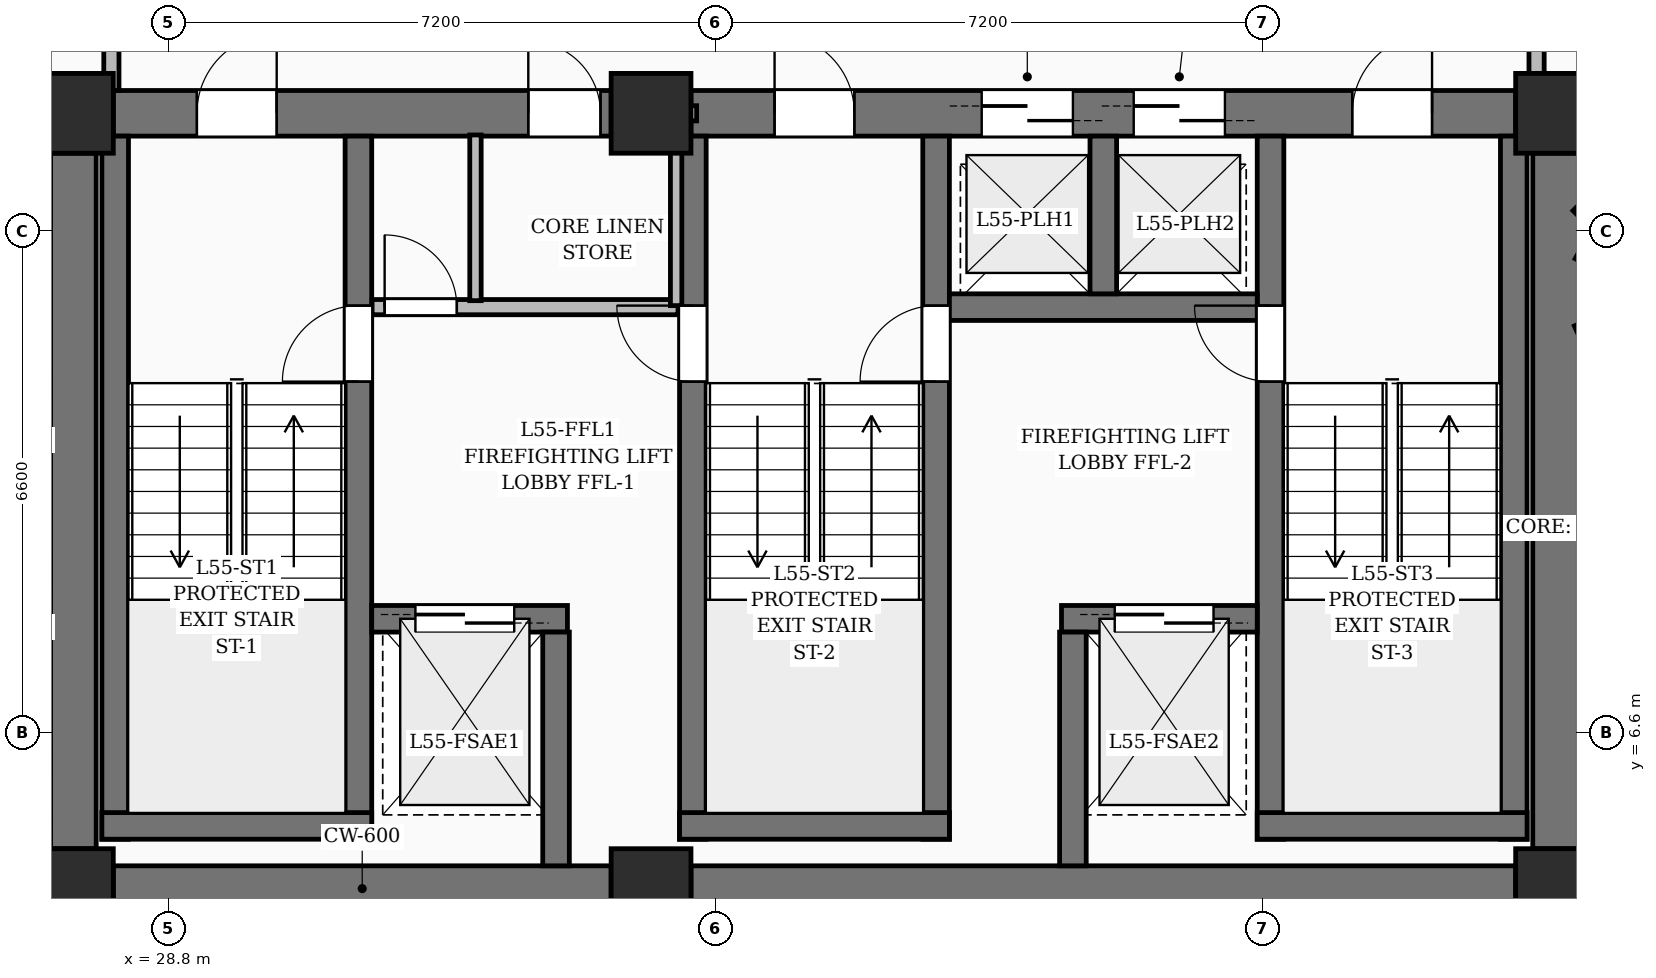
"""IFC4 building model, lengths in metres.
Left out: names, types, materials, properties, quantities, classifications, styles, units other than length and angle.
Written with IfcOpenShell. Run it as: python <this file> out.ifc"""

import sys

from ifc_helpers import new_model, si_unit, direction, frame, frame_2d, origin, origin_2d, place, context, subcontext, project, spatial, rectangle, extrude, element, fill, save


model = new_model("IFC4")
c1 = context("Model", 3, precision=1e-05, world=origin(), true_north=direction((0.0, 1.0)))
c2 = subcontext(c1, "Body", "Model", "MODEL_VIEW")
j1 = project(units=[si_unit("LENGTHUNIT", "METRE"), si_unit("PLANEANGLEUNIT", "RADIAN")], contexts=[c1])
p1 = place(None, origin())
s1 = spatial("IfcSite", under=j1, at=p1, CompositionType="ELEMENT")
p2 = place(p1, origin())
s2 = spatial("IfcBuilding", under=s1, at=p2, CompositionType="ELEMENT")
p3 = place(p2, frame((0.0, 0.0, 214.5)))
s3 = spatial("IfcBuildingStorey", under=s2, at=p3, CompositionType="ELEMENT", Elevation=214.5)
for number, where, z_axis, x_axis in (
    (1, (27.55, 4.55, 0.0), (0.0, 0.0, 1.0), (1.0, 0.0, 0.0)),
    (2, (35.15, 4.55, 0.0), (0.0, 0.0, 1.0), (1.0, 0.0, 0.0)),
    (3, (47.05, 4.55, 0.0), (0.0, 0.0, 1.0), (1.0, 0.0, 0.0)),
    (4, (27.55, 14.75, 0.0), (0.0, 0.0, 1.0), (1.0, 0.0, 0.0)),
    (5, (35.15, 14.75, 0.0), (0.0, 0.0, 1.0), (1.0, 0.0, 0.0)),
    (6, (47.05, 14.75, 0.0), (0.0, 0.0, 1.0), (1.0, 0.0, 0.0)),
):
    element("IfcColumn", number, at=place(p3, frame(where, z_axis=z_axis, x_axis=x_axis)), inside=s3, PredefinedType="COLUMN", context=c2, shape_type="SweptSolid", body=[
        extrude(rectangle(XDim=1.05, YDim=1.05, at=origin_2d()), origin(), (0.0, 0.0, 1.0), 3.75),
    ])
p4 = place(p3, frame((28.075, 4.55, 0.0), z_axis=(0.0, 0.0, 1.0), x_axis=(1.0, 0.0, 0.0)))
e7 = element("IfcWall", 7, at=p4, inside=s3, PredefinedType="SHEAR", context=c2, shape_type="SweptSolid", body=[
    extrude(rectangle(XDim=6.55, YDim=0.6, at=frame_2d((3.275, 0.0))), origin(), (0.0, 0.0, 1.0), 3.75),
])
p5 = place(p3, frame((35.675, 4.55, 0.0), z_axis=(0.0, 0.0, 1.0), x_axis=(1.0, 0.0, 0.0)))
e8 = element("IfcWall", 8, at=p5, inside=s3, PredefinedType="SHEAR", context=c2, shape_type="SweptSolid", body=[
    extrude(rectangle(XDim=10.85, YDim=0.6, at=frame_2d((5.425, 0.0))), origin(), (0.0, 0.0, 1.0), 3.75),
])
p6 = place(p3, frame((28.075, 14.75, 0.0), z_axis=(0.0, 0.0, 1.0), x_axis=(1.0, 0.0, 0.0)))
e9 = element("IfcWall", 9, at=p6, inside=s3, PredefinedType="SHEAR", context=c2, shape_type="SweptSolid", body=[
    extrude(rectangle(XDim=6.55, YDim=0.6, at=frame_2d((3.275, 0.0))), origin(), (0.0, 0.0, 1.0), 3.75),
])
p7 = place(p6, frame((1.1, 0.0, 0.0)))
e10 = element("IfcOpeningElement", 10, at=p7, cuts=e9, PredefinedType="OPENING", context=c2, shape_type="SweptSolid", body=[
    extrude(rectangle(XDim=1.05, YDim=2.15, at=frame_2d((0.525, 1.075))), frame((0.0, 0.31, 0.0), z_axis=(0.0, -1.0, 0.0), x_axis=(1.0, 0.0, 0.0)), (0.0, 0.0, 1.0), 0.62),
])
p8 = place(p6, frame((5.46, 0.0, 0.0)))
e11 = element("IfcOpeningElement", 11, at=p8, cuts=e9, PredefinedType="OPENING", context=c2, shape_type="SweptSolid", body=[
    extrude(rectangle(XDim=0.95, YDim=2.15, at=frame_2d((0.475, 1.075))), frame((0.0, 0.31, 0.0), z_axis=(0.0, -1.0, 0.0), x_axis=(1.0, 0.0, 0.0)), (0.0, 0.0, 1.0), 0.62),
])
p9 = place(p3, frame((35.675, 14.75, 0.0), z_axis=(0.0, 0.0, 1.0), x_axis=(1.0, 0.0, 0.0)))
e12 = element("IfcWall", 12, at=p9, inside=s3, PredefinedType="SHEAR", context=c2, shape_type="SweptSolid", body=[
    extrude(rectangle(XDim=10.85, YDim=0.6, at=frame_2d((5.425, 0.0))), origin(), (0.0, 0.0, 1.0), 3.75),
])
p10 = place(p9, frame((1.1, 0.0, 0.0)))
e13 = element("IfcOpeningElement", 13, at=p10, cuts=e12, PredefinedType="OPENING", context=c2, shape_type="SweptSolid", body=[
    extrude(rectangle(XDim=1.05, YDim=2.15, at=frame_2d((0.525, 1.075))), frame((0.0, 0.31, 0.0), z_axis=(0.0, -1.0, 0.0), x_axis=(1.0, 0.0, 0.0)), (0.0, 0.0, 1.0), 0.62),
])
p11 = place(p9, frame((8.7, 0.0, 0.0)))
e14 = element("IfcOpeningElement", 14, at=p11, cuts=e12, PredefinedType="OPENING", context=c2, shape_type="SweptSolid", body=[
    extrude(rectangle(XDim=1.05, YDim=2.15, at=frame_2d((0.525, 1.075))), frame((0.0, 0.31, 0.0), z_axis=(0.0, -1.0, 0.0), x_axis=(1.0, 0.0, 0.0)), (0.0, 0.0, 1.0), 0.62),
])
p12 = place(p9, frame((3.825, 0.0, 0.0)))
e15 = element("IfcOpeningElement", 15, at=p12, cuts=e12, PredefinedType="OPENING", context=c2, shape_type="SweptSolid", body=[
    extrude(rectangle(XDim=1.2, YDim=2.2, at=frame_2d((0.6, 1.1))), frame((0.0, 0.31, 0.0), z_axis=(0.0, -1.0, 0.0), x_axis=(1.0, 0.0, 0.0)), (0.0, 0.0, 1.0), 0.62),
])
p13 = place(p9, frame((5.825, 0.0, 0.0)))
e16 = element("IfcOpeningElement", 16, at=p13, cuts=e12, PredefinedType="OPENING", context=c2, shape_type="SweptSolid", body=[
    extrude(rectangle(XDim=1.2, YDim=2.2, at=frame_2d((0.6, 1.1))), frame((0.0, 0.31, 0.0), z_axis=(0.0, -1.0, 0.0), x_axis=(1.0, 0.0, 0.0)), (0.0, 0.0, 1.0), 0.62),
])
for number, where, z_axis, x_axis in (
    (17, (27.55, 5.075, 0.0), (0.0, 0.0, 1.0), (0.0, 1.0, 0.0)),
    (18, (47.05, 5.075, 0.0), (0.0, 0.0, 1.0), (0.0, 1.0, 0.0)),
):
    element("IfcWall", number, at=place(p3, frame(where, z_axis=z_axis, x_axis=x_axis)), inside=s3, PredefinedType="SHEAR", context=c2, shape_type="SweptSolid", body=[
        extrude(rectangle(XDim=9.15, YDim=0.6, at=frame_2d((4.575, 0.0))), origin(), (0.0, 0.0, 1.0), 3.75),
    ])
p14 = place(p3, frame((28.1, 5.2, 0.0), z_axis=(0.0, 0.0, 1.0), x_axis=(0.0, 1.0, 0.0)))
e19 = element("IfcWall", 19, at=p14, inside=s3, PredefinedType="SOLIDWALL", context=c2, shape_type="SweptSolid", body=[
    extrude(rectangle(XDim=9.25, YDim=0.35, at=frame_2d((4.625, 0.0))), origin(), (0.0, 0.0, 1.0), 3.75),
])
p15 = place(p3, frame((31.3, 5.2, 0.0), z_axis=(0.0, 0.0, 1.0), x_axis=(0.0, 1.0, 0.0)))
e20 = element("IfcWall", 20, at=p15, inside=s3, PredefinedType="SOLIDWALL", context=c2, shape_type="SweptSolid", body=[
    extrude(rectangle(XDim=9.25, YDim=0.35, at=frame_2d((4.625, 0.0))), origin(), (0.0, 0.0, 1.0), 3.75),
])
p16 = place(p15, frame((6.02, 0.0, 0.0)))
e21 = element("IfcOpeningElement", 21, at=p16, cuts=e20, PredefinedType="OPENING", context=c2, shape_type="SweptSolid", body=[
    extrude(rectangle(XDim=1.0, YDim=2.15, at=frame_2d((0.5, 1.075))), frame((0.0, 0.185, 0.0), z_axis=(0.0, -1.0, 0.0), x_axis=(1.0, 0.0, 0.0)), (0.0, 0.0, 1.0), 0.37),
])
p17 = place(p3, frame((27.925, 5.375, 0.0), z_axis=(0.0, 0.0, 1.0), x_axis=(1.0, 0.0, 0.0)))
e22 = element("IfcWall", 22, at=p17, inside=s3, PredefinedType="SOLIDWALL", context=c2, shape_type="SweptSolid", body=[
    extrude(rectangle(XDim=3.55, YDim=0.35, at=frame_2d((1.775, 0.0))), origin(), (0.0, 0.0, 1.0), 3.75),
])
p18 = place(p3, frame((35.7, 5.2, 0.0), z_axis=(0.0, 0.0, 1.0), x_axis=(0.0, 1.0, 0.0)))
e23 = element("IfcWall", 23, at=p18, inside=s3, PredefinedType="SOLIDWALL", context=c2, shape_type="SweptSolid", body=[
    extrude(rectangle(XDim=9.25, YDim=0.35, at=frame_2d((4.625, 0.0))), origin(), (0.0, 0.0, 1.0), 3.75),
])
p19 = place(p18, frame((6.02, 0.0, 0.0)))
e24 = element("IfcOpeningElement", 24, at=p19, cuts=e23, PredefinedType="OPENING", context=c2, shape_type="SweptSolid", body=[
    extrude(rectangle(XDim=1.0, YDim=2.15, at=frame_2d((0.5, 1.075))), frame((0.0, 0.185, 0.0), z_axis=(0.0, -1.0, 0.0), x_axis=(1.0, 0.0, 0.0)), (0.0, 0.0, 1.0), 0.37),
])
p20 = place(p3, frame((38.9, 5.2, 0.0), z_axis=(0.0, 0.0, 1.0), x_axis=(0.0, 1.0, 0.0)))
e25 = element("IfcWall", 25, at=p20, inside=s3, PredefinedType="SOLIDWALL", context=c2, shape_type="SweptSolid", body=[
    extrude(rectangle(XDim=9.25, YDim=0.35, at=frame_2d((4.625, 0.0))), origin(), (0.0, 0.0, 1.0), 3.75),
])
p21 = place(p20, frame((6.02, 0.0, 0.0)))
e26 = element("IfcOpeningElement", 26, at=p21, cuts=e25, PredefinedType="OPENING", context=c2, shape_type="SweptSolid", body=[
    extrude(rectangle(XDim=1.0, YDim=2.15, at=frame_2d((0.5, 1.075))), frame((0.0, 0.185, 0.0), z_axis=(0.0, -1.0, 0.0), x_axis=(1.0, 0.0, 0.0)), (0.0, 0.0, 1.0), 0.37),
])
p22 = place(p3, frame((35.525, 5.375, 0.0), z_axis=(0.0, 0.0, 1.0), x_axis=(1.0, 0.0, 0.0)))
e27 = element("IfcWall", 27, at=p22, inside=s3, PredefinedType="SOLIDWALL", context=c2, shape_type="SweptSolid", body=[
    extrude(rectangle(XDim=3.55, YDim=0.35, at=frame_2d((1.775, 0.0))), origin(), (0.0, 0.0, 1.0), 3.75),
])
p23 = place(p3, frame((43.3, 5.2, 0.0), z_axis=(0.0, 0.0, 1.0), x_axis=(0.0, 1.0, 0.0)))
e28 = element("IfcWall", 28, at=p23, inside=s3, PredefinedType="SOLIDWALL", context=c2, shape_type="SweptSolid", body=[
    extrude(rectangle(XDim=9.25, YDim=0.35, at=frame_2d((4.625, 0.0))), origin(), (0.0, 0.0, 1.0), 3.75),
])
p24 = place(p23, frame((6.02, 0.0, 0.0)))
e29 = element("IfcOpeningElement", 29, at=p24, cuts=e28, PredefinedType="OPENING", context=c2, shape_type="SweptSolid", body=[
    extrude(rectangle(XDim=1.0, YDim=2.15, at=frame_2d((0.5, 1.075))), frame((0.0, 0.185, 0.0), z_axis=(0.0, -1.0, 0.0), x_axis=(1.0, 0.0, 0.0)), (0.0, 0.0, 1.0), 0.37),
])
p25 = place(p3, frame((46.5, 5.2, 0.0), z_axis=(0.0, 0.0, 1.0), x_axis=(0.0, 1.0, 0.0)))
e30 = element("IfcWall", 30, at=p25, inside=s3, PredefinedType="SOLIDWALL", context=c2, shape_type="SweptSolid", body=[
    extrude(rectangle(XDim=9.25, YDim=0.35, at=frame_2d((4.625, 0.0))), origin(), (0.0, 0.0, 1.0), 3.75),
])
p26 = place(p3, frame((43.125, 5.375, 0.0), z_axis=(0.0, 0.0, 1.0), x_axis=(1.0, 0.0, 0.0)))
e31 = element("IfcWall", 31, at=p26, inside=s3, PredefinedType="SOLIDWALL", context=c2, shape_type="SweptSolid", body=[
    extrude(rectangle(XDim=3.55, YDim=0.35, at=frame_2d((1.775, 0.0))), origin(), (0.0, 0.0, 1.0), 3.75),
])
p27 = place(p3, frame((31.475, 8.1, 0.0), z_axis=(0.0, 0.0, 1.0), x_axis=(1.0, 0.0, 0.0)))
e32 = element("IfcWall", 32, at=p27, inside=s3, PredefinedType="SOLIDWALL", context=c2, shape_type="SweptSolid", body=[
    extrude(rectangle(XDim=2.575, YDim=0.35, at=frame_2d((1.288, 0.0))), origin(), (0.0, 0.0, 1.0), 3.75),
])
p28 = place(p27, frame((0.575, 0.0, 0.0)))
e33 = element("IfcOpeningElement", 33, at=p28, cuts=e32, PredefinedType="OPENING", context=c2, shape_type="SweptSolid", body=[
    extrude(rectangle(XDim=1.3, YDim=2.25, at=frame_2d((0.65, 1.125))), frame((0.0, 0.185, 0.0), z_axis=(0.0, -1.0, 0.0), x_axis=(1.0, 0.0, 0.0)), (0.0, 0.0, 1.0), 0.37),
])
p29 = place(p3, frame((40.55, 8.1, 0.0), z_axis=(0.0, 0.0, 1.0), x_axis=(1.0, 0.0, 0.0)))
e34 = element("IfcWall", 34, at=p29, inside=s3, PredefinedType="SOLIDWALL", context=c2, shape_type="SweptSolid", body=[
    extrude(rectangle(XDim=2.575, YDim=0.35, at=frame_2d((1.288, 0.0))), origin(), (0.0, 0.0, 1.0), 3.75),
])
p30 = place(p29, frame((0.7, 0.0, 0.0)))
e35 = element("IfcOpeningElement", 35, at=p30, cuts=e34, PredefinedType="OPENING", context=c2, shape_type="SweptSolid", body=[
    extrude(rectangle(XDim=1.3, YDim=2.25, at=frame_2d((0.65, 1.125))), frame((0.0, 0.185, 0.0), z_axis=(0.0, -1.0, 0.0), x_axis=(1.0, 0.0, 0.0)), (0.0, 0.0, 1.0), 0.37),
])
for number, where, z_axis, x_axis in (
    (36, (33.9, 4.85, 0.0), (0.0, 0.0, 1.0), (0.0, 1.0, 0.0)),
    (37, (40.7, 4.85, 0.0), (0.0, 0.0, 1.0), (0.0, 1.0, 0.0)),
):
    element("IfcWall", number, at=place(p3, frame(where, z_axis=z_axis, x_axis=x_axis)), inside=s3, PredefinedType="SOLIDWALL", context=c2, shape_type="SweptSolid", body=[
        extrude(rectangle(XDim=3.075, YDim=0.35, at=frame_2d((1.538, 0.0))), origin(), (0.0, 0.0, 1.0), 3.75),
    ])
p31 = place(p3, frame((39.075, 12.2, 0.0), z_axis=(0.0, 0.0, 1.0), x_axis=(1.0, 0.0, 0.0)))
e38 = element("IfcWall", 38, at=p31, inside=s3, PredefinedType="SOLIDWALL", context=c2, shape_type="SweptSolid", body=[
    extrude(rectangle(XDim=4.05, YDim=0.35, at=frame_2d((2.025, 0.0))), origin(), (0.0, 0.0, 1.0), 3.75),
])
p32 = place(p3, frame((41.1, 12.375, 0.0), z_axis=(0.0, 0.0, 1.0), x_axis=(0.0, 1.0, 0.0)))
e39 = element("IfcWall", 39, at=p32, inside=s3, PredefinedType="SOLIDWALL", context=c2, shape_type="SweptSolid", body=[
    extrude(rectangle(XDim=2.075, YDim=0.35, at=frame_2d((1.038, 0.0))), origin(), (0.0, 0.0, 1.0), 3.75),
])
p33 = place(p3, frame((34.72, 14.75, 0.0), z_axis=(0.0, 0.0, 1.0), x_axis=(1.0, 0.0, 0.0)))
e40 = element("IfcWall", 40, at=p33, inside=s3, PredefinedType="PARTITIONING", context=c2, shape_type="SweptSolid", body=[
    extrude(rectangle(XDim=1.03, YDim=0.2, at=frame_2d((0.515, 0.0))), origin(), (0.0, 0.0, 1.0), 2.685),
])
p34 = place(p3, frame((31.48, 12.2, 0.0), z_axis=(0.0, 0.0, 1.0), x_axis=(1.0, 0.0, 0.0)))
e41 = element("IfcWall", 41, at=p34, inside=s3, PredefinedType="PARTITIONING", context=c2, shape_type="SweptSolid", body=[
    extrude(rectangle(XDim=4.025, YDim=0.2, at=frame_2d((2.012, 0.0))), origin(), (0.0, 0.0, 1.0), 3.5),
])
p35 = place(p34, frame((0.165, 0.0, 0.0)))
e42 = element("IfcOpeningElement", 42, at=p35, cuts=e41, PredefinedType="OPENING", context=c2, shape_type="SweptSolid", body=[
    extrude(rectangle(XDim=0.95, YDim=2.15, at=frame_2d((0.475, 1.075))), frame((0.0, 0.11, 0.0), z_axis=(0.0, -1.0, 0.0), x_axis=(1.0, 0.0, 0.0)), (0.0, 0.0, 1.0), 0.22),
])
p36 = place(p3, frame((32.84, 12.285, 0.0), z_axis=(0.0, 0.0, 1.0), x_axis=(0.0, 1.0, 0.0)))
e43 = element("IfcWall", 43, at=p36, inside=s3, PredefinedType="PARTITIONING", context=c2, shape_type="SweptSolid", body=[
    extrude(rectangle(XDim=2.18, YDim=0.15, at=frame_2d((1.09, 0.0))), origin(), (0.0, 0.0, 1.0), 2.685),
])
p37 = place(p3, frame((35.48, 12.22, 0.0), z_axis=(0.0, 0.0, 1.0), x_axis=(0.0, 1.0, 0.0)))
e44 = element("IfcWall", 44, at=p37, inside=s3, PredefinedType="PARTITIONING", context=c2, shape_type="SweptSolid", body=[
    extrude(rectangle(XDim=2.396, YDim=0.15, at=frame_2d((1.198, 0.0))), origin(), (0.0, 0.0, 1.0), 3.5),
])
p38 = place(p3, frame((28.05, 16.75, 0.0), z_axis=(0.0, 0.0, 1.0), x_axis=(0.0, -1.0, 0.0)))
e45 = element("IfcWall", 45, at=p38, inside=s3, PredefinedType="PARTITIONING", context=c2, shape_type="SweptSolid", body=[
    extrude(rectangle(XDim=1.7, YDim=0.2, at=frame_2d((0.85, 0.0))), origin(), (0.0, 0.0, 1.0), 3.5),
])
p39 = place(p3, frame((46.8, 15.05, 0.0), z_axis=(0.0, 0.0, 1.0), x_axis=(0.0, 1.0, 0.0)))
e46 = element("IfcWall", 46, at=p39, inside=s3, PredefinedType="PARTITIONING", context=c2, shape_type="SweptSolid", body=[
    extrude(rectangle(XDim=1.7, YDim=0.2, at=frame_2d((0.85, 0.0))), origin(), (0.0, 0.0, 1.0), 2.685),
])
p40 = place(p3, frame((49.55, 7.19, 0.0), z_axis=(0.0, 0.0, 1.0), x_axis=(-0.410297221829, 0.91195185715, 0.0)))
e47 = element("IfcWall", 47, at=p40, inside=s3, PredefinedType="PARTITIONING", context=c2, shape_type="SweptSolid", body=[
    extrude(rectangle(XDim=5.267, YDim=0.2, at=frame_2d((2.634, 0.0))), origin(), (0.0, 0.0, 1.0), 2.685),
])
p41 = place(p3, frame((48.8, 12.09, 0.0), z_axis=(0.0, 0.0, 1.0), x_axis=(-0.707106781187, 0.707106781187, 0.0)))
e48 = element("IfcWall", 48, at=p41, inside=s3, PredefinedType="PARTITIONING", context=c2, shape_type="SweptSolid", body=[
    extrude(rectangle(XDim=2.051, YDim=0.2, at=frame_2d((1.025, 0.0))), origin(), (0.0, 0.0, 1.0), 3.5),
])
p42 = place(p3, frame((47.35, 12.914, 0.0), z_axis=(0.0, 0.0, 1.0), x_axis=(0.876281108122, -0.481800186331, 0.0)))
e49 = element("IfcWall", 49, at=p42, inside=s3, PredefinedType="PARTITIONING", context=c2, shape_type="SweptSolid", body=[
    extrude(rectangle(XDim=0.87, YDim=0.175, at=frame_2d((0.435, 0.0))), origin(), (0.0, 0.0, 1.0), 3.5),
])
p43 = place(p7, origin())
e50 = element("IfcDoor", 50, at=p43, inside=s3, OperationType="SINGLE_SWING_RIGHT", PredefinedType="DOOR", context=c2, shape_type="SweptSolid", body=[
    extrude(rectangle(XDim=1.05, YDim=2.15, at=frame_2d((0.525, 1.075))), frame((0.0, 0.025, 0.0), z_axis=(0.0, -1.0, 0.0), x_axis=(1.0, 0.0, 0.0)), (0.0, 0.0, 1.0), 0.05),
])
fill(e10, e50)
p44 = place(p10, origin())
e51 = element("IfcDoor", 51, at=p44, inside=s3, OperationType="SINGLE_SWING_LEFT", PredefinedType="DOOR", context=c2, shape_type="SweptSolid", body=[
    extrude(rectangle(XDim=1.05, YDim=2.15, at=frame_2d((0.525, 1.075))), frame((0.0, 0.025, 0.0), z_axis=(0.0, -1.0, 0.0), x_axis=(1.0, 0.0, 0.0)), (0.0, 0.0, 1.0), 0.05),
])
fill(e13, e51)
p45 = place(p11, origin())
e52 = element("IfcDoor", 52, at=p45, inside=s3, OperationType="SINGLE_SWING_RIGHT", PredefinedType="DOOR", context=c2, shape_type="SweptSolid", body=[
    extrude(rectangle(XDim=1.05, YDim=2.15, at=frame_2d((0.525, 1.075))), frame((0.0, 0.025, 0.0), z_axis=(0.0, -1.0, 0.0), x_axis=(1.0, 0.0, 0.0)), (0.0, 0.0, 1.0), 0.05),
])
fill(e14, e52)
p46 = place(p16, origin())
e53 = element("IfcDoor", 53, at=p46, inside=s3, OperationType="SINGLE_SWING_LEFT", PredefinedType="DOOR", context=c2, shape_type="SweptSolid", body=[
    extrude(rectangle(XDim=1.0, YDim=2.15, at=frame_2d((0.5, 1.075))), frame((0.0, 0.025, 0.0), z_axis=(0.0, -1.0, 0.0), x_axis=(1.0, 0.0, 0.0)), (0.0, 0.0, 1.0), 0.05),
])
fill(e21, e53)
p47 = place(p19, origin())
e54 = element("IfcDoor", 54, at=p47, inside=s3, OperationType="SINGLE_SWING_RIGHT", PredefinedType="DOOR", context=c2, shape_type="SweptSolid", body=[
    extrude(rectangle(XDim=1.0, YDim=2.15, at=frame_2d((0.5, 1.075))), frame((0.0, 0.025, 0.0), z_axis=(0.0, -1.0, 0.0), x_axis=(1.0, 0.0, 0.0)), (0.0, 0.0, 1.0), 0.05),
])
fill(e24, e54)
p48 = place(p21, origin())
e55 = element("IfcDoor", 55, at=p48, inside=s3, OperationType="SINGLE_SWING_LEFT", PredefinedType="DOOR", context=c2, shape_type="SweptSolid", body=[
    extrude(rectangle(XDim=1.0, YDim=2.15, at=frame_2d((0.5, 1.075))), frame((0.0, 0.025, 0.0), z_axis=(0.0, -1.0, 0.0), x_axis=(1.0, 0.0, 0.0)), (0.0, 0.0, 1.0), 0.05),
])
fill(e26, e55)
p49 = place(p24, origin())
e56 = element("IfcDoor", 56, at=p49, inside=s3, OperationType="SINGLE_SWING_RIGHT", PredefinedType="DOOR", context=c2, shape_type="SweptSolid", body=[
    extrude(rectangle(XDim=1.0, YDim=2.15, at=frame_2d((0.5, 1.075))), frame((0.0, 0.025, 0.0), z_axis=(0.0, -1.0, 0.0), x_axis=(1.0, 0.0, 0.0)), (0.0, 0.0, 1.0), 0.05),
])
fill(e29, e56)
p50 = place(p28, origin())
e57 = element("IfcDoor", 57, at=p50, inside=s3, OperationType="DOUBLE_DOOR_SLIDING", PredefinedType="DOOR", context=c2, shape_type="SweptSolid", body=[
    extrude(rectangle(XDim=1.3, YDim=2.25, at=frame_2d((0.65, 1.125))), frame((0.0, 0.025, 0.0), z_axis=(0.0, -1.0, 0.0), x_axis=(1.0, 0.0, 0.0)), (0.0, 0.0, 1.0), 0.05),
])
fill(e33, e57)
p51 = place(p30, origin())
e58 = element("IfcDoor", 58, at=p51, inside=s3, OperationType="DOUBLE_DOOR_SLIDING", PredefinedType="DOOR", context=c2, shape_type="SweptSolid", body=[
    extrude(rectangle(XDim=1.3, YDim=2.25, at=frame_2d((0.65, 1.125))), frame((0.0, 0.025, 0.0), z_axis=(0.0, -1.0, 0.0), x_axis=(1.0, 0.0, 0.0)), (0.0, 0.0, 1.0), 0.05),
])
fill(e35, e58)
p52 = place(p12, origin())
e59 = element("IfcDoor", 59, at=p52, inside=s3, OperationType="DOUBLE_DOOR_SLIDING", PredefinedType="DOOR", context=c2, shape_type="SweptSolid", body=[
    extrude(rectangle(XDim=1.2, YDim=2.2, at=frame_2d((0.6, 1.1))), frame((0.0, 0.025, 0.0), z_axis=(0.0, -1.0, 0.0), x_axis=(1.0, 0.0, 0.0)), (0.0, 0.0, 1.0), 0.05),
])
fill(e15, e59)
p53 = place(p13, origin())
e60 = element("IfcDoor", 60, at=p53, inside=s3, OperationType="DOUBLE_DOOR_SLIDING", PredefinedType="DOOR", context=c2, shape_type="SweptSolid", body=[
    extrude(rectangle(XDim=1.2, YDim=2.2, at=frame_2d((0.6, 1.1))), frame((0.0, 0.025, 0.0), z_axis=(0.0, -1.0, 0.0), x_axis=(1.0, 0.0, 0.0)), (0.0, 0.0, 1.0), 0.05),
])
fill(e16, e60)
p54 = place(p35, origin())
e61 = element("IfcDoor", 61, at=p54, inside=s3, OperationType="SINGLE_SWING_LEFT", PredefinedType="DOOR", context=c2, shape_type="SweptSolid", body=[
    extrude(rectangle(XDim=0.95, YDim=2.15, at=frame_2d((0.475, 1.075))), frame((0.0, 0.025, 0.0), z_axis=(0.0, -1.0, 0.0), x_axis=(1.0, 0.0, 0.0)), (0.0, 0.0, 1.0), 0.05),
])
fill(e42, e61)
p55 = place(p8, origin())
e62 = element("IfcDoor", 62, at=p55, inside=s3, OperationType="SINGLE_SWING_LEFT", PredefinedType="DOOR", context=c2, shape_type="SweptSolid", body=[
    extrude(rectangle(XDim=0.95, YDim=2.15, at=frame_2d((0.475, 1.075))), frame((0.0, 0.025, 0.0), z_axis=(0.0, -1.0, 0.0), x_axis=(1.0, 0.0, 0.0)), (0.0, 0.0, 1.0), 0.05),
])
fill(e11, e62)
save(model, sys.argv[1])
